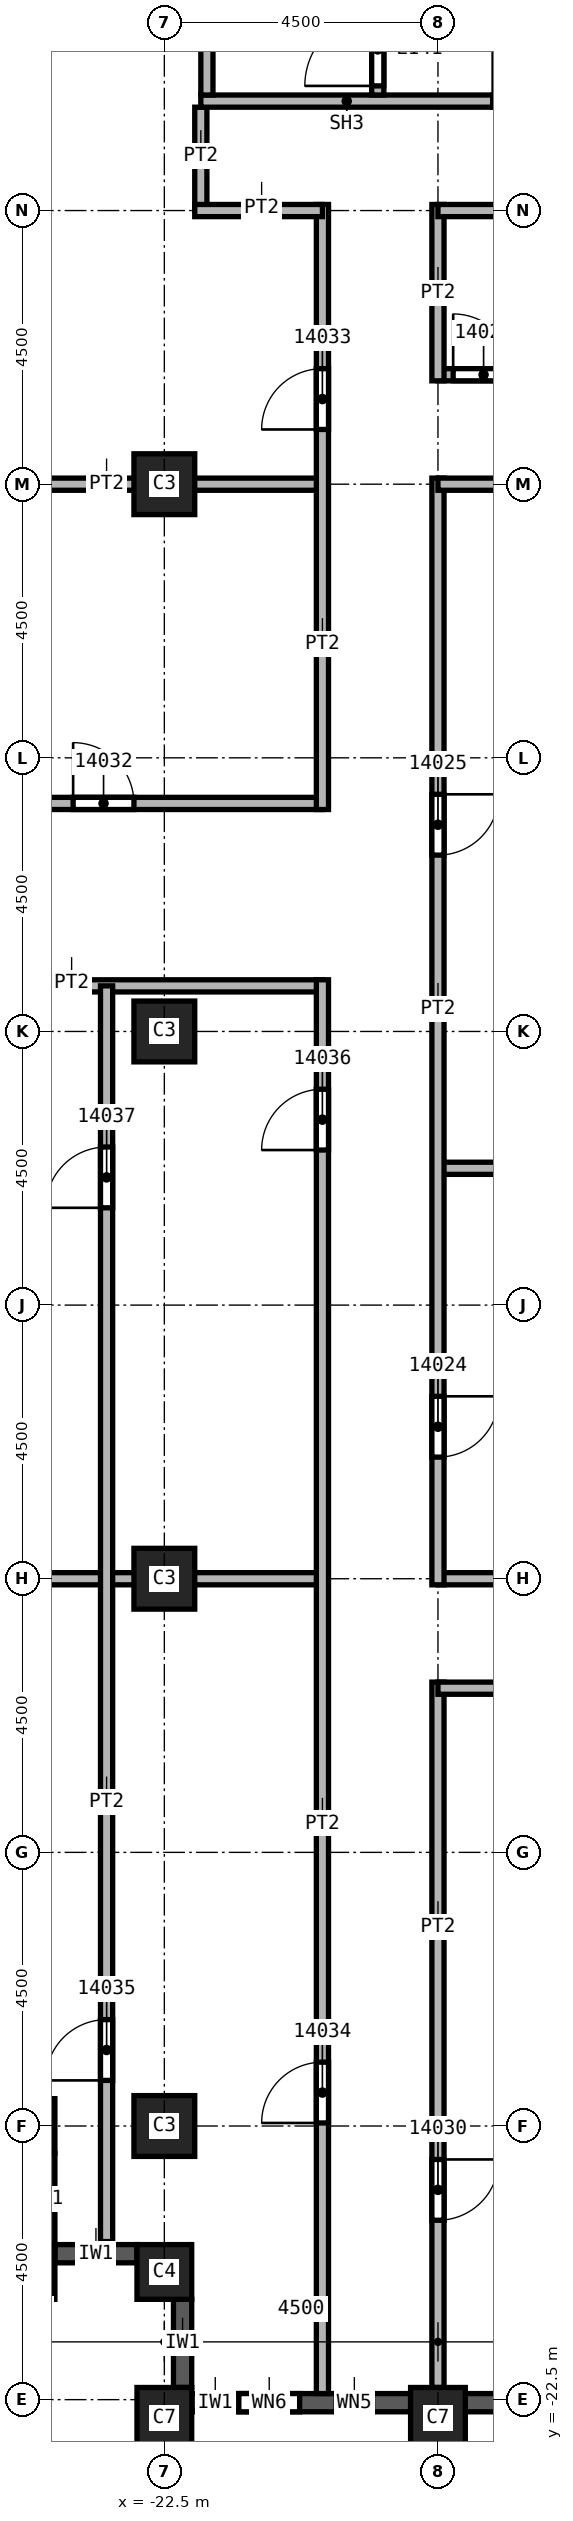
"""IFC4 building model, lengths in metres.
Left out: names, types, materials, properties, quantities, classifications, styles, units other than length and angle.
Written with IfcOpenShell. Run it as: python <this file> out.ifc"""

import sys

from ifc_helpers import new_model, si_unit, direction, frame, frame_2d, origin, origin_2d, place, context, subcontext, project, spatial, rectangle, extrude, element, fill, save


model = new_model("IFC4")
c1 = context("Model", 3, precision=1e-05, world=origin(), true_north=direction((0.0, 1.0)))
c2 = subcontext(c1, "Body", "Model", "MODEL_VIEW")
j1 = project(units=[si_unit("LENGTHUNIT", "METRE"), si_unit("PLANEANGLEUNIT", "RADIAN")], contexts=[c1])
p1 = place(None, origin())
s1 = spatial("IfcSite", under=j1, at=p1, CompositionType="ELEMENT")
p2 = place(p1, origin())
s2 = spatial("IfcBuilding", under=s1, at=p2, CompositionType="ELEMENT")
p3 = place(p2, frame((0.0, 0.0, 224.0)))
s3 = spatial("IfcBuildingStorey", under=s2, at=p3, CompositionType="ELEMENT", Elevation=224.0)
for number, where, z_axis, x_axis in (
    (1, (-22.5, 0.0, 0.0), (0.0, 0.0, 1.0), (1.0, 0.0, 0.0)),
    (2, (-22.5, 9.0, 0.0), (0.0, 0.0, 1.0), (1.0, 0.0, 0.0)),
    (3, (-22.5, -9.0, 0.0), (0.0, 0.0, 1.0), (1.0, 0.0, 0.0)),
    (4, (-22.5, -18.0, 0.0), (0.0, 0.0, 1.0), (1.0, 0.0, 0.0)),
):
    element("IfcColumn", number, at=place(p3, frame(where, z_axis=z_axis, x_axis=x_axis)), inside=s3, PredefinedType="COLUMN", context=c2, shape_type="SweptSolid", body=[
        extrude(rectangle(XDim=1.0, YDim=1.0, at=origin_2d()), origin(), (0.0, 0.0, 1.0), 3.72),
    ])
for number, where, z_axis, x_axis in (
    (5, (-18.0, -22.8, 0.0), (0.0, 0.0, 1.0), (1.0, 0.0, 0.0)),
    (6, (-22.5, -22.8, 0.0), (0.0, 0.0, 1.0), (1.0, 0.0, 0.0)),
):
    element("IfcColumn", number, at=place(p3, frame(where, z_axis=z_axis, x_axis=x_axis)), inside=s3, PredefinedType="COLUMN", context=c2, shape_type="SweptSolid", body=[
        extrude(rectangle(XDim=0.9, YDim=1.0, at=origin_2d()), origin(), (0.0, 0.0, 1.0), 3.72),
    ])
for number, where, z_axis, x_axis in (
    (7, (-22.5, -20.4, 0.0), (0.0, 0.0, 1.0), (1.0, 0.0, 0.0)),
    (8, (-24.75, -20.4, 0.0), (0.0, 0.0, 1.0), (1.0, 0.0, 0.0)),
    (9, (-24.75, -18.0, 0.0), (0.0, 0.0, 1.0), (1.0, 0.0, 0.0)),
):
    element("IfcColumn", number, at=place(p3, frame(where, z_axis=z_axis, x_axis=x_axis)), inside=s3, PredefinedType="COLUMN", context=c2, shape_type="SweptSolid", body=[
        extrude(rectangle(XDim=0.9, YDim=0.9, at=origin_2d()), origin(), (0.0, 0.0, 1.0), 3.72),
    ])
p4 = place(p3, frame((-24.45, -18.45, 0.0), z_axis=(0.0, 0.0, 1.0), x_axis=(0.0, -1.0, 0.0)))
e10 = element("IfcWall", 10, at=p4, inside=s3, PredefinedType="SOLIDWALL", context=c2, shape_type="SweptSolid", body=[
    extrude(rectangle(XDim=1.5, YDim=0.3, at=frame_2d((0.75, 0.0))), origin(), (0.0, 0.0, 1.0), 3.12),
])
p5 = place(p3, frame((-24.3, -20.1, 0.0), z_axis=(0.0, 0.0, 1.0), x_axis=(1.0, 0.0, 0.0)))
e11 = element("IfcWall", 11, at=p5, inside=s3, PredefinedType="SOLIDWALL", context=c2, shape_type="SweptSolid", body=[
    extrude(rectangle(XDim=1.35, YDim=0.3, at=frame_2d((0.675, 0.0))), origin(), (0.0, 0.0, 1.0), 3.12),
])
p6 = place(p3, frame((-22.2, -20.85, 0.0), z_axis=(0.0, 0.0, 1.0), x_axis=(0.0, -1.0, 0.0)))
e12 = element("IfcWall", 12, at=p6, inside=s3, PredefinedType="SOLIDWALL", context=c2, shape_type="SweptSolid", body=[
    extrude(rectangle(XDim=1.45, YDim=0.3, at=frame_2d((0.725, 0.0))), origin(), (0.0, 0.0, 1.0), 3.12),
])
p7 = place(p3, frame((-22.05, -22.55, 0.0), z_axis=(0.0, 0.0, 1.0), x_axis=(1.0, 0.0, 0.0)))
e13 = element("IfcWall", 13, at=p7, inside=s3, PredefinedType="SOLIDWALL", context=c2, shape_type="SweptSolid", body=[
    extrude(rectangle(XDim=3.6, YDim=0.3, at=frame_2d((1.8, 0.0))), origin(), (0.0, 0.0, 1.0), 3.12),
])
p8 = place(p7, frame((0.775, 0.0, 0.8)))
e14 = element("IfcOpeningElement", 14, at=p8, cuts=e13, PredefinedType="OPENING", context=c2, shape_type="SweptSolid", body=[
    extrude(rectangle(XDim=1.0, YDim=1.95, at=frame_2d((0.5, 0.975))), frame((0.0, 0.15, 0.0), z_axis=(0.0, -1.0, 0.0), x_axis=(1.0, 0.0, 0.0)), (0.0, 0.0, 1.0), 0.3),
])
p9 = place(p7, frame((2.375, 0.0, 0.8)))
e15 = element("IfcOpeningElement", 15, at=p9, cuts=e13, PredefinedType="OPENING", context=c2, shape_type="SweptSolid", body=[
    extrude(rectangle(XDim=0.6, YDim=1.95, at=frame_2d((0.3, 0.975))), frame((0.0, 0.15, 0.0), z_axis=(0.0, -1.0, 0.0), x_axis=(1.0, 0.0, 0.0)), (0.0, 0.0, 1.0), 0.3),
])
p10 = place(p3, frame((-17.55, -22.55, 0.0), z_axis=(0.0, 0.0, 1.0), x_axis=(1.0, 0.0, 0.0)))
e16 = element("IfcWall", 16, at=p10, inside=s3, PredefinedType="SOLIDWALL", context=c2, shape_type="SweptSolid", body=[
    extrude(rectangle(XDim=3.6, YDim=0.3, at=frame_2d((1.8, 0.0))), origin(), (0.0, 0.0, 1.0), 3.12),
])
p11 = place(p10, frame((0.6, 0.0, 0.8)))
e17 = element("IfcOpeningElement", 17, at=p11, cuts=e16, PredefinedType="OPENING", context=c2, shape_type="SweptSolid", body=[
    extrude(rectangle(XDim=2.4, YDim=1.95, at=frame_2d((1.2, 0.975))), frame((0.0, 0.15, 0.0), z_axis=(0.0, -1.0, 0.0), x_axis=(1.0, 0.0, 0.0)), (0.0, 0.0, 1.0), 0.3),
])
p12 = place(p3, frame((-33.85, 3.75, 0.0), z_axis=(0.0, 0.0, 1.0), x_axis=(1.0, 0.0, 0.0)))
e18 = element("IfcWall", 18, at=p12, inside=s3, PredefinedType="PARTITIONING", context=c2, shape_type="SweptSolid", body=[
    extrude(rectangle(XDim=13.95, YDim=0.2, at=frame_2d((6.975, 0.0))), origin(), (0.0, 0.0, 1.0), 3.72),
])
p13 = place(p12, frame((9.85, 0.0, 0.0)))
e19 = element("IfcOpeningElement", 19, at=p13, cuts=e18, PredefinedType="OPENING", context=c2, shape_type="SweptSolid", body=[
    extrude(rectangle(XDim=1.0, YDim=2.1, at=frame_2d((0.5, 1.05))), frame((0.0, 0.1, 0.0), z_axis=(0.0, -1.0, 0.0), x_axis=(1.0, 0.0, 0.0)), (0.0, 0.0, 1.0), 0.2),
])
p14 = place(p3, frame((-19.9, 0.75, 0.0), z_axis=(0.0, 0.0, 1.0), x_axis=(-1.0, 0.0, 0.0)))
e20 = element("IfcWall", 20, at=p14, inside=s3, PredefinedType="PARTITIONING", context=c2, shape_type="SweptSolid", body=[
    extrude(rectangle(XDim=13.95, YDim=0.2, at=frame_2d((6.975, 0.0))), origin(), (0.0, 0.0, 1.0), 3.72),
])
p15 = place(p14, frame((8.15, 0.0, 0.0)))
e21 = element("IfcOpeningElement", 21, at=p15, cuts=e20, PredefinedType="OPENING", context=c2, shape_type="SweptSolid", body=[
    extrude(rectangle(XDim=1.0, YDim=2.1, at=frame_2d((0.5, 1.05))), frame((0.0, 0.1, 0.0), z_axis=(0.0, -1.0, 0.0), x_axis=(1.0, 0.0, 0.0)), (0.0, 0.0, 1.0), 0.2),
])
for number, where, z_axis, x_axis in (
    (22, (-27.1, -9.0, 0.0), (0.0, 0.0, 1.0), (1.0, 0.0, 0.0)),
    (23, (-27.1, 9.0, 0.0), (0.0, 0.0, 1.0), (1.0, 0.0, 0.0)),
):
    element("IfcWall", number, at=place(p3, frame(where, z_axis=z_axis, x_axis=x_axis)), inside=s3, PredefinedType="PARTITIONING", context=c2, shape_type="SweptSolid", body=[
        extrude(rectangle(XDim=7.2, YDim=0.2, at=frame_2d((3.6, 0.0))), origin(), (0.0, 0.0, 1.0), 3.72),
    ])
p16 = place(p3, frame((-23.45, -19.9, 0.0), z_axis=(0.0, 0.0, 1.0), x_axis=(0.0, 1.0, 0.0)))
e24 = element("IfcWall", 24, at=p16, inside=s3, PredefinedType="PARTITIONING", context=c2, shape_type="SweptSolid", body=[
    extrude(rectangle(XDim=20.65, YDim=0.2, at=frame_2d((10.325, 0.0))), origin(), (0.0, 0.0, 1.0), 3.72),
])
p17 = place(p16, frame((2.65, 0.0, 0.0)))
e25 = element("IfcOpeningElement", 25, at=p17, cuts=e24, PredefinedType="OPENING", context=c2, shape_type="SweptSolid", body=[
    extrude(rectangle(XDim=1.0, YDim=2.1, at=frame_2d((0.5, 1.05))), frame((0.0, 0.1, 0.0), z_axis=(0.0, -1.0, 0.0), x_axis=(1.0, 0.0, 0.0)), (0.0, 0.0, 1.0), 0.2),
])
p18 = place(p16, frame((17.0, 0.0, 0.0)))
e26 = element("IfcOpeningElement", 26, at=p18, cuts=e24, PredefinedType="OPENING", context=c2, shape_type="SweptSolid", body=[
    extrude(rectangle(XDim=1.0, YDim=2.1, at=frame_2d((0.5, 1.05))), frame((0.0, 0.1, 0.0), z_axis=(0.0, -1.0, 0.0), x_axis=(1.0, 0.0, 0.0)), (0.0, 0.0, 1.0), 0.2),
])
p19 = place(p3, frame((-21.9, 13.5, 0.0), z_axis=(0.0, 0.0, 1.0), x_axis=(0.0, 1.0, 0.0)))
e27 = element("IfcWall", 27, at=p19, inside=s3, PredefinedType="PARTITIONING", context=c2, shape_type="SweptSolid", body=[
    extrude(rectangle(XDim=1.7, YDim=0.2, at=frame_2d((0.85, 0.0))), origin(), (0.0, 0.0, 1.0), 3.72),
])
p20 = place(p3, frame((-19.9, -22.4, 0.0), z_axis=(0.0, 0.0, 1.0), x_axis=(0.0, 1.0, 0.0)))
e28 = element("IfcWall", 28, at=p20, inside=s3, PredefinedType="PARTITIONING", context=c2, shape_type="SweptSolid", body=[
    extrude(rectangle(XDim=23.25, YDim=0.2, at=frame_2d((11.625, 0.0))), origin(), (0.0, 0.0, 1.0), 3.72),
])
p21 = place(p20, frame((4.45, 0.0, 0.0)))
e29 = element("IfcOpeningElement", 29, at=p21, cuts=e28, PredefinedType="OPENING", context=c2, shape_type="SweptSolid", body=[
    extrude(rectangle(XDim=1.0, YDim=2.1, at=frame_2d((0.5, 1.05))), frame((0.0, 0.1, 0.0), z_axis=(0.0, -1.0, 0.0), x_axis=(1.0, 0.0, 0.0)), (0.0, 0.0, 1.0), 0.2),
])
p22 = place(p20, frame((20.45, 0.0, 0.0)))
e30 = element("IfcOpeningElement", 30, at=p22, cuts=e28, PredefinedType="OPENING", context=c2, shape_type="SweptSolid", body=[
    extrude(rectangle(XDim=1.0, YDim=2.1, at=frame_2d((0.5, 1.05))), frame((0.0, 0.1, 0.0), z_axis=(0.0, -1.0, 0.0), x_axis=(1.0, 0.0, 0.0)), (0.0, 0.0, 1.0), 0.2),
])
p23 = place(p3, frame((-19.9, 3.65, 0.0), z_axis=(0.0, 0.0, 1.0), x_axis=(0.0, 1.0, 0.0)))
e31 = element("IfcWall", 31, at=p23, inside=s3, PredefinedType="PARTITIONING", context=c2, shape_type="SweptSolid", body=[
    extrude(rectangle(XDim=9.95, YDim=0.2, at=frame_2d((4.975, 0.0))), origin(), (0.0, 0.0, 1.0), 3.72),
])
p24 = place(p23, frame((6.25, 0.0, 0.0)))
e32 = element("IfcOpeningElement", 32, at=p24, cuts=e31, PredefinedType="OPENING", context=c2, shape_type="SweptSolid", body=[
    extrude(rectangle(XDim=1.0, YDim=2.1, at=frame_2d((0.5, 1.05))), frame((0.0, 0.1, 0.0), z_axis=(0.0, -1.0, 0.0), x_axis=(1.0, 0.0, 0.0)), (0.0, 0.0, 1.0), 0.2),
])
p25 = place(p3, frame((-19.9, 13.5, 0.0), z_axis=(0.0, 0.0, 1.0), x_axis=(-1.0, 0.0, 0.0)))
e33 = element("IfcWall", 33, at=p25, inside=s3, PredefinedType="PARTITIONING", context=c2, shape_type="SweptSolid", body=[
    extrude(rectangle(XDim=2.1, YDim=0.2, at=frame_2d((1.05, 0.0))), origin(), (0.0, 0.0, 1.0), 3.72),
])
p26 = place(p3, frame((-18.0, -10.7, 0.0), z_axis=(0.0, 0.0, 1.0), x_axis=(0.0, -1.0, 0.0)))
e34 = element("IfcWall", 34, at=p26, inside=s3, PredefinedType="PARTITIONING", context=c2, shape_type="SweptSolid", body=[
    extrude(rectangle(XDim=11.6, YDim=0.2, at=frame_2d((5.8, 0.0))), origin(), (0.0, 0.0, 1.0), 3.72),
])
p27 = place(p26, frame((7.85, 0.0, 0.0)))
e35 = element("IfcOpeningElement", 35, at=p27, cuts=e34, PredefinedType="OPENING", context=c2, shape_type="SweptSolid", body=[
    extrude(rectangle(XDim=1.0, YDim=2.1, at=frame_2d((0.5, 1.05))), frame((0.0, 0.1, 0.0), z_axis=(0.0, -1.0, 0.0), x_axis=(1.0, 0.0, 0.0)), (0.0, 0.0, 1.0), 0.2),
])
for number, where, z_axis, x_axis in (
    (36, (-18.0, -9.0, 0.0), (0.0, 0.0, 1.0), (1.0, 0.0, 0.0)),
    (37, (-18.0, -2.25, 0.0), (0.0, 0.0, 1.0), (1.0, 0.0, 0.0)),
):
    element("IfcWall", number, at=place(p3, frame(where, z_axis=z_axis, x_axis=x_axis)), inside=s3, PredefinedType="PARTITIONING", context=c2, shape_type="SweptSolid", body=[
        extrude(rectangle(XDim=4.5, YDim=0.2, at=frame_2d((2.25, 0.0))), origin(), (0.0, 0.0, 1.0), 3.72),
    ])
p28 = place(p3, frame((-18.0, 9.1, 0.0), z_axis=(0.0, 0.0, 1.0), x_axis=(0.0, -1.0, 0.0)))
e38 = element("IfcWall", 38, at=p28, inside=s3, PredefinedType="PARTITIONING", context=c2, shape_type="SweptSolid", body=[
    extrude(rectangle(XDim=18.2, YDim=0.2, at=frame_2d((9.1, 0.0))), origin(), (0.0, 0.0, 1.0), 3.72),
])
p29 = place(p28, frame((15.1, 0.0, 0.0)))
e39 = element("IfcOpeningElement", 39, at=p29, cuts=e38, PredefinedType="OPENING", context=c2, shape_type="SweptSolid", body=[
    extrude(rectangle(XDim=1.0, YDim=2.1, at=frame_2d((0.5, 1.05))), frame((0.0, 0.1, 0.0), z_axis=(0.0, -1.0, 0.0), x_axis=(1.0, 0.0, 0.0)), (0.0, 0.0, 1.0), 0.2),
])
p30 = place(p28, frame((5.2, 0.0, 0.0)))
e40 = element("IfcOpeningElement", 40, at=p30, cuts=e38, PredefinedType="OPENING", context=c2, shape_type="SweptSolid", body=[
    extrude(rectangle(XDim=1.0, YDim=2.1, at=frame_2d((0.5, 1.05))), frame((0.0, 0.1, 0.0), z_axis=(0.0, -1.0, 0.0), x_axis=(1.0, 0.0, 0.0)), (0.0, 0.0, 1.0), 0.2),
])
p31 = place(p3, frame((-18.0, 10.8, 0.0), z_axis=(0.0, 0.0, 1.0), x_axis=(1.0, 0.0, 0.0)))
e41 = element("IfcWall", 41, at=p31, inside=s3, PredefinedType="PARTITIONING", context=c2, shape_type="SweptSolid", body=[
    extrude(rectangle(XDim=3.6, YDim=0.2, at=frame_2d((1.8, 0.0))), origin(), (0.0, 0.0, 1.0), 3.72),
])
p32 = place(p31, frame((0.25, 0.0, 0.0)))
e42 = element("IfcOpeningElement", 42, at=p32, cuts=e41, PredefinedType="OPENING", context=c2, shape_type="SweptSolid", body=[
    extrude(rectangle(XDim=1.0, YDim=2.1, at=frame_2d((0.5, 1.05))), frame((0.0, 0.1, 0.0), z_axis=(0.0, -1.0, 0.0), x_axis=(1.0, 0.0, 0.0)), (0.0, 0.0, 1.0), 0.2),
])
p33 = place(p3, frame((-18.0, 13.6, 0.0), z_axis=(0.0, 0.0, 1.0), x_axis=(0.0, -1.0, 0.0)))
e43 = element("IfcWall", 43, at=p33, inside=s3, PredefinedType="PARTITIONING", context=c2, shape_type="SweptSolid", body=[
    extrude(rectangle(XDim=2.9, YDim=0.2, at=frame_2d((1.45, 0.0))), origin(), (0.0, 0.0, 1.0), 3.72),
])
p34 = place(p3, frame((-15.3, 13.5, 0.0), z_axis=(0.0, 0.0, 1.0), x_axis=(-1.0, 0.0, 0.0)))
e44 = element("IfcWall", 44, at=p34, inside=s3, PredefinedType="PARTITIONING", context=c2, shape_type="SweptSolid", body=[
    extrude(rectangle(XDim=2.7, YDim=0.2, at=frame_2d((1.35, 0.0))), origin(), (0.0, 0.0, 1.0), 3.72),
])
p35 = place(p3, frame((-14.4, -10.8, 0.0), z_axis=(0.0, 0.0, 1.0), x_axis=(-1.0, 0.0, 0.0)))
e45 = element("IfcWall", 45, at=p35, inside=s3, PredefinedType="PARTITIONING", context=c2, shape_type="SweptSolid", body=[
    extrude(rectangle(XDim=3.6, YDim=0.2, at=frame_2d((1.8, 0.0))), origin(), (0.0, 0.0, 1.0), 3.72),
])
p36 = place(p3, frame((-13.5, 9.0, 0.0), z_axis=(0.0, 0.0, 1.0), x_axis=(-1.0, 0.0, 0.0)))
e46 = element("IfcWall", 46, at=p36, inside=s3, PredefinedType="PARTITIONING", context=c2, shape_type="SweptSolid", body=[
    extrude(rectangle(XDim=4.5, YDim=0.2, at=frame_2d((2.25, 0.0))), origin(), (0.0, 0.0, 1.0), 3.72),
])
p37 = place(p3, frame((-21.9, 15.3, 0.0), z_axis=(0.0, 0.0, 1.0), x_axis=(1.0, 0.0, 0.0)))
e47 = element("IfcWall", 47, at=p37, inside=s3, PredefinedType="SOLIDWALL", context=c2, shape_type="SweptSolid", body=[
    extrude(rectangle(XDim=8.275, YDim=0.2, at=frame_2d((4.137, 0.0))), origin(), (0.0, 0.0, 1.0), 3.72),
])
p38 = place(p37, frame((4.8, 0.0, 0.0)))
e48 = element("IfcOpeningElement", 48, at=p38, cuts=e47, PredefinedType="OPENING", context=c2, shape_type="SweptSolid", body=[
    extrude(rectangle(XDim=1.2, YDim=2.1, at=frame_2d((0.6, 1.05))), frame((0.0, 0.1, 0.0), z_axis=(0.0, -1.0, 0.0), x_axis=(1.0, 0.0, 0.0)), (0.0, 0.0, 1.0), 0.2),
])
p39 = place(p3, frame((-21.8, 15.4, 0.0), z_axis=(0.0, 0.0, 1.0), x_axis=(0.0, 1.0, 0.0)))
e49 = element("IfcWall", 49, at=p39, inside=s3, PredefinedType="SOLIDWALL", context=c2, shape_type="SweptSolid", body=[
    extrude(rectangle(XDim=5.9, YDim=0.2, at=frame_2d((2.95, 0.0))), origin(), (0.0, 0.0, 1.0), 3.72),
])
p40 = place(p3, frame((-18.99, 15.4, 0.0), z_axis=(0.0, 0.0, 1.0), x_axis=(0.0, 1.0, 0.0)))
e50 = element("IfcWall", 50, at=p40, inside=s3, PredefinedType="SOLIDWALL", context=c2, shape_type="SweptSolid", body=[
    extrude(rectangle(XDim=5.9, YDim=0.2, at=frame_2d((2.95, 0.0))), origin(), (0.0, 0.0, 1.0), 3.72),
])
p41 = place(p40, frame((0.15, 0.0, 0.0)))
e51 = element("IfcOpeningElement", 51, at=p41, cuts=e50, PredefinedType="OPENING", context=c2, shape_type="SweptSolid", body=[
    extrude(rectangle(XDim=1.2, YDim=2.1, at=frame_2d((0.6, 1.05))), frame((0.0, 0.1, 0.0), z_axis=(0.0, -1.0, 0.0), x_axis=(1.0, 0.0, 0.0)), (0.0, 0.0, 1.0), 0.2),
])
p42 = place(p29, origin())
e52 = element("IfcDoor", 52, at=p42, inside=s3, OperationType="SINGLE_SWING_LEFT", PredefinedType="DOOR", context=c2, shape_type="SweptSolid", body=[
    extrude(rectangle(XDim=1.0, YDim=2.1, at=frame_2d((0.5, 1.05))), frame((0.0, 0.025, 0.0), z_axis=(0.0, -1.0, 0.0), x_axis=(1.0, 0.0, 0.0)), (0.0, 0.0, 1.0), 0.05),
])
fill(e39, e52)
p43 = place(p30, origin())
e53 = element("IfcDoor", 53, at=p43, inside=s3, OperationType="SINGLE_SWING_RIGHT", PredefinedType="DOOR", context=c2, shape_type="SweptSolid", body=[
    extrude(rectangle(XDim=1.0, YDim=2.1, at=frame_2d((0.5, 1.05))), frame((0.0, 0.025, 0.0), z_axis=(0.0, -1.0, 0.0), x_axis=(1.0, 0.0, 0.0)), (0.0, 0.0, 1.0), 0.05),
])
fill(e40, e53)
p44 = place(p32, origin())
e54 = element("IfcDoor", 54, at=p44, inside=s3, OperationType="SINGLE_SWING_LEFT", PredefinedType="DOOR", context=c2, shape_type="SweptSolid", body=[
    extrude(rectangle(XDim=1.0, YDim=2.1, at=frame_2d((0.5, 1.05))), frame((0.0, 0.025, 0.0), z_axis=(0.0, -1.0, 0.0), x_axis=(1.0, 0.0, 0.0)), (0.0, 0.0, 1.0), 0.05),
])
fill(e42, e54)
p45 = place(p27, origin())
e55 = element("IfcDoor", 55, at=p45, inside=s3, OperationType="SINGLE_SWING_LEFT", PredefinedType="DOOR", context=c2, shape_type="SweptSolid", body=[
    extrude(rectangle(XDim=1.0, YDim=2.1, at=frame_2d((0.5, 1.05))), frame((0.0, 0.025, 0.0), z_axis=(0.0, -1.0, 0.0), x_axis=(1.0, 0.0, 0.0)), (0.0, 0.0, 1.0), 0.05),
])
fill(e35, e55)
p46 = place(p13, origin())
e56 = element("IfcDoor", 56, at=p46, inside=s3, OperationType="SINGLE_SWING_LEFT", PredefinedType="DOOR", context=c2, shape_type="SweptSolid", body=[
    extrude(rectangle(XDim=1.0, YDim=2.1, at=frame_2d((0.5, 1.05))), frame((0.0, 0.025, 0.0), z_axis=(0.0, -1.0, 0.0), x_axis=(1.0, 0.0, 0.0)), (0.0, 0.0, 1.0), 0.05),
])
fill(e19, e56)
p47 = place(p24, origin())
e57 = element("IfcDoor", 57, at=p47, inside=s3, OperationType="SINGLE_SWING_RIGHT", PredefinedType="DOOR", context=c2, shape_type="SweptSolid", body=[
    extrude(rectangle(XDim=1.0, YDim=2.1, at=frame_2d((0.5, 1.05))), frame((0.0, 0.025, 0.0), z_axis=(0.0, -1.0, 0.0), x_axis=(1.0, 0.0, 0.0)), (0.0, 0.0, 1.0), 0.05),
])
fill(e32, e57)
p48 = place(p21, origin())
e58 = element("IfcDoor", 58, at=p48, inside=s3, OperationType="SINGLE_SWING_LEFT", PredefinedType="DOOR", context=c2, shape_type="SweptSolid", body=[
    extrude(rectangle(XDim=1.0, YDim=2.1, at=frame_2d((0.5, 1.05))), frame((0.0, 0.025, 0.0), z_axis=(0.0, -1.0, 0.0), x_axis=(1.0, 0.0, 0.0)), (0.0, 0.0, 1.0), 0.05),
])
fill(e29, e58)
p49 = place(p17, origin())
e59 = element("IfcDoor", 59, at=p49, inside=s3, OperationType="SINGLE_SWING_RIGHT", PredefinedType="DOOR", context=c2, shape_type="SweptSolid", body=[
    extrude(rectangle(XDim=1.0, YDim=2.1, at=frame_2d((0.5, 1.05))), frame((0.0, 0.025, 0.0), z_axis=(0.0, -1.0, 0.0), x_axis=(1.0, 0.0, 0.0)), (0.0, 0.0, 1.0), 0.05),
])
fill(e25, e59)
p50 = place(p22, origin())
e60 = element("IfcDoor", 60, at=p50, inside=s3, OperationType="SINGLE_SWING_LEFT", PredefinedType="DOOR", context=c2, shape_type="SweptSolid", body=[
    extrude(rectangle(XDim=1.0, YDim=2.1, at=frame_2d((0.5, 1.05))), frame((0.0, 0.025, 0.0), z_axis=(0.0, -1.0, 0.0), x_axis=(1.0, 0.0, 0.0)), (0.0, 0.0, 1.0), 0.05),
])
fill(e30, e60)
p51 = place(p18, origin())
e61 = element("IfcDoor", 61, at=p51, inside=s3, OperationType="SINGLE_SWING_RIGHT", PredefinedType="DOOR", context=c2, shape_type="SweptSolid", body=[
    extrude(rectangle(XDim=1.0, YDim=2.1, at=frame_2d((0.5, 1.05))), frame((0.0, 0.025, 0.0), z_axis=(0.0, -1.0, 0.0), x_axis=(1.0, 0.0, 0.0)), (0.0, 0.0, 1.0), 0.05),
])
fill(e26, e61)
p52 = place(p41, origin())
e62 = element("IfcDoor", 62, at=p52, inside=s3, OperationType="SINGLE_SWING_LEFT", PredefinedType="DOOR", context=c2, shape_type="SweptSolid", body=[
    extrude(rectangle(XDim=1.2, YDim=2.1, at=frame_2d((0.6, 1.05))), frame((0.0, 0.025, 0.0), z_axis=(0.0, -1.0, 0.0), x_axis=(1.0, 0.0, 0.0)), (0.0, 0.0, 1.0), 0.05),
])
fill(e51, e62)
p53 = place(p8, origin())
e63 = element("IfcWindow", 63, at=p53, inside=s3, PartitioningType="SINGLE_PANEL", PredefinedType="WINDOW", context=c2, shape_type="SweptSolid", body=[
    extrude(rectangle(XDim=1.0, YDim=1.95, at=frame_2d((0.5, 0.975))), frame((0.0, 0.03, 0.0), z_axis=(0.0, -1.0, 0.0), x_axis=(1.0, 0.0, 0.0)), (0.0, 0.0, 1.0), 0.06),
])
fill(e14, e63)
p54 = place(p9, origin())
e64 = element("IfcWindow", 64, at=p54, inside=s3, PartitioningType="SINGLE_PANEL", PredefinedType="WINDOW", context=c2, shape_type="SweptSolid", body=[
    extrude(rectangle(XDim=0.6, YDim=1.95, at=frame_2d((0.3, 0.975))), frame((0.0, 0.03, 0.0), z_axis=(0.0, -1.0, 0.0), x_axis=(1.0, 0.0, 0.0)), (0.0, 0.0, 1.0), 0.06),
])
fill(e15, e64)
save(model, sys.argv[1])
